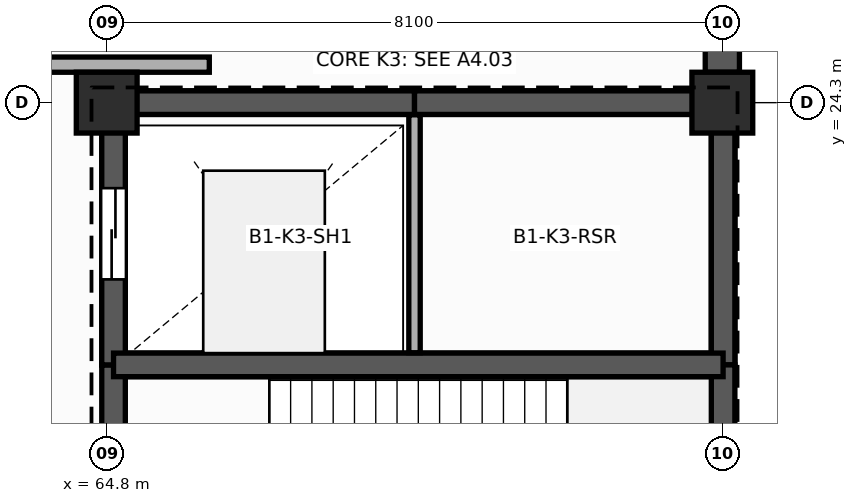
"""IFC4 building model, lengths in metres.
Left out: names, types, materials, properties, quantities, classifications, styles, units other than length and angle.
Written with IfcOpenShell. Run it as: python <this file> out.ifc"""

import sys

from ifc_helpers import new_model, si_unit, direction, frame, frame_2d, origin, origin_2d, place, context, subcontext, project, spatial, rectangle, extrude, element, fill, save


model = new_model("IFC4")
c1 = context("Model", 3, precision=1e-05, world=origin(), true_north=direction((0.0, 1.0)))
c2 = subcontext(c1, "Body", "Model", "MODEL_VIEW")
j1 = project(units=[si_unit("LENGTHUNIT", "METRE"), si_unit("PLANEANGLEUNIT", "RADIAN")], contexts=[c1])
p1 = place(None, origin())
s1 = spatial("IfcSite", under=j1, at=p1, CompositionType="ELEMENT")
p2 = place(p1, origin())
s2 = spatial("IfcBuilding", under=s1, at=p2, CompositionType="ELEMENT")
p3 = place(p2, frame((0.0, 0.0, -5.4)))
s3 = spatial("IfcBuildingStorey", under=s2, at=p3, CompositionType="ELEMENT", Elevation=-5.4)
for number, where, z_axis, x_axis in (
    (1, (64.8, 24.3, -0.4), (0.0, 0.0, 1.0), (1.0, 0.0, 0.0)),
    (2, (72.9, 24.3, -0.4), (0.0, 0.0, 1.0), (1.0, 0.0, 0.0)),
):
    element("IfcColumn", number, at=place(p3, frame(where, z_axis=z_axis, x_axis=x_axis)), inside=s3, PredefinedType="COLUMN", context=c2, shape_type="SweptSolid", body=[
        extrude(rectangle(XDim=0.8, YDim=0.8, at=origin_2d()), origin(), (0.0, 0.0, 1.0), 5.8),
    ])
p4 = place(p3, frame((72.9, 24.7, 0.0), z_axis=(0.0, 0.0, 1.0), x_axis=(0.0, 1.0, 0.0)))
e3 = element("IfcWall", 3, at=p4, inside=s3, PredefinedType="USERDEFINED", context=c2, shape_type="SweptSolid", body=[
    extrude(rectangle(XDim=7.3, YDim=0.45, at=frame_2d((3.65, 0.0))), origin(), (0.0, 0.0, 1.0), 5.1),
])
p5 = place(p3, frame((64.89, 20.85, -1.35), z_axis=(0.0, 0.0, 1.0), x_axis=(1.0, 0.0, 0.0)))
e4 = element("IfcWall", 4, at=p5, inside=s3, PredefinedType="SHEAR", context=c2, shape_type="SweptSolid", body=[
    extrude(rectangle(XDim=8.02, YDim=0.31, at=frame_2d((4.01, 0.0))), origin(), (0.0, 0.0, 1.0), 0.95),
])
p6 = place(p3, frame((72.91, 20.85, -1.35), z_axis=(0.0, 0.0, 1.0), x_axis=(0.0, 1.0, 0.0)))
e5 = element("IfcWall", 5, at=p6, inside=s3, PredefinedType="SHEAR", context=c2, shape_type="SweptSolid", body=[
    extrude(rectangle(XDim=3.45, YDim=0.31, at=frame_2d((1.725, 0.0))), origin(), (0.0, 0.0, 1.0), 0.95),
])
p7 = place(p3, frame((72.91, 24.3, -1.35), z_axis=(0.0, 0.0, 1.0), x_axis=(-1.0, 0.0, 0.0)))
e6 = element("IfcWall", 6, at=p7, inside=s3, PredefinedType="SHEAR", context=c2, shape_type="SweptSolid", body=[
    extrude(rectangle(XDim=8.02, YDim=0.31, at=frame_2d((4.01, 0.0))), origin(), (0.0, 0.0, 1.0), 0.95),
])
p8 = place(p3, frame((64.89, 24.3, -1.35), z_axis=(0.0, 0.0, 1.0), x_axis=(0.0, -1.0, 0.0)))
e7 = element("IfcWall", 7, at=p8, inside=s3, PredefinedType="SHEAR", context=c2, shape_type="SweptSolid", body=[
    extrude(rectangle(XDim=3.45, YDim=0.31, at=frame_2d((1.725, 0.0))), origin(), (0.0, 0.0, 1.0), 0.95),
])
p9 = place(p3, frame((64.89, 16.45, -0.4), z_axis=(0.0, 0.0, 1.0), x_axis=(0.0, 1.0, 0.0)))
e8 = element("IfcWall", 8, at=p9, inside=s3, PredefinedType="SHEAR", context=c2, shape_type="SweptSolid", body=[
    extrude(rectangle(XDim=4.4, YDim=0.31, at=frame_2d((2.2, 0.0))), origin(), (0.0, 0.0, 1.0), 5.8),
])
p10 = place(p9, frame((1.35, 0.0, 0.4)))
e9 = element("IfcOpeningElement", 9, at=p10, cuts=e8, PredefinedType="OPENING", context=c2, shape_type="SweptSolid", body=[
    extrude(rectangle(XDim=1.2, YDim=2.25, at=frame_2d((0.6, 1.125))), frame((0.0, 0.165, 0.0), z_axis=(0.0, -1.0, 0.0), x_axis=(1.0, 0.0, 0.0)), (0.0, 0.0, 1.0), 0.33),
])
p11 = place(p3, frame((64.89, 20.85, -0.4), z_axis=(0.0, 0.0, 1.0), x_axis=(0.0, 1.0, 0.0)))
e10 = element("IfcWall", 10, at=p11, inside=s3, PredefinedType="SHEAR", context=c2, shape_type="SweptSolid", body=[
    extrude(rectangle(XDim=3.45, YDim=0.31, at=frame_2d((1.725, 0.0))), origin(), (0.0, 0.0, 1.0), 5.8),
])
p12 = place(p11, frame((1.125, 0.0, 0.4)))
e11 = element("IfcOpeningElement", 11, at=p12, cuts=e10, PredefinedType="OPENING", context=c2, shape_type="SweptSolid", body=[
    extrude(rectangle(XDim=1.2, YDim=2.2, at=frame_2d((0.6, 1.1))), frame((0.0, 0.165, 0.0), z_axis=(0.0, -1.0, 0.0), x_axis=(1.0, 0.0, 0.0)), (0.0, 0.0, 1.0), 0.33),
])
p13 = place(p3, frame((64.89, 24.3, -0.4), z_axis=(0.0, 0.0, 1.0), x_axis=(1.0, 0.0, 0.0)))
e12 = element("IfcWall", 12, at=p13, inside=s3, PredefinedType="SHEAR", context=c2, shape_type="SweptSolid", body=[
    extrude(rectangle(XDim=3.96, YDim=0.31, at=frame_2d((1.98, 0.0))), origin(), (0.0, 0.0, 1.0), 5.8),
])
p14 = place(p3, frame((68.85, 24.3, -0.4), z_axis=(0.0, 0.0, 1.0), x_axis=(1.0, 0.0, 0.0)))
e13 = element("IfcWall", 13, at=p14, inside=s3, PredefinedType="SHEAR", context=c2, shape_type="SweptSolid", body=[
    extrude(rectangle(XDim=4.06, YDim=0.31, at=frame_2d((2.03, 0.0))), origin(), (0.0, 0.0, 1.0), 5.8),
])
p15 = place(p3, frame((72.91, 24.3, -0.4), z_axis=(0.0, 0.0, 1.0), x_axis=(0.0, -1.0, 0.0)))
e14 = element("IfcWall", 14, at=p15, inside=s3, PredefinedType="SHEAR", context=c2, shape_type="SweptSolid", body=[
    extrude(rectangle(XDim=3.45, YDim=0.31, at=frame_2d((1.725, 0.0))), origin(), (0.0, 0.0, 1.0), 5.8),
])
p16 = place(p3, frame((72.91, 20.85, -0.4), z_axis=(0.0, 0.0, 1.0), x_axis=(0.0, -1.0, 0.0)))
e15 = element("IfcWall", 15, at=p16, inside=s3, PredefinedType="SHEAR", context=c2, shape_type="SweptSolid", body=[
    extrude(rectangle(XDim=4.4, YDim=0.31, at=frame_2d((2.2, 0.0))), origin(), (0.0, 0.0, 1.0), 5.8),
])
p17 = place(p3, frame((64.89, 20.85, -0.4), z_axis=(0.0, 0.0, 1.0), x_axis=(1.0, 0.0, 0.0)))
e16 = element("IfcWall", 16, at=p17, inside=s3, PredefinedType="SHEAR", context=c2, shape_type="SweptSolid", body=[
    extrude(rectangle(XDim=8.02, YDim=0.31, at=frame_2d((4.01, 0.0))), origin(), (0.0, 0.0, 1.0), 5.8),
])
p18 = place(p3, frame((68.85, 21.01, 0.0), z_axis=(0.0, 0.0, 1.0), x_axis=(0.0, 1.0, 0.0)))
e17 = element("IfcWall", 17, at=p18, inside=s3, PredefinedType="PLUMBINGWALL", context=c2, shape_type="SweptSolid", body=[
    extrude(rectangle(XDim=3.13, YDim=0.15, at=frame_2d((1.565, 0.0))), origin(), (0.0, 0.0, 1.0), 5.05),
])
p19 = place(p3, frame((66.15, 24.8, 0.0), z_axis=(0.0, 0.0, 1.0), x_axis=(-1.0, 0.0, 0.0)))
e18 = element("IfcWall", 18, at=p19, inside=s3, PredefinedType="PARTITIONING", context=c2, shape_type="SweptSolid", body=[
    extrude(rectangle(XDim=6.35, YDim=0.2, at=frame_2d((3.175, 0.0))), origin(), (0.0, 0.0, 1.0), 5.12),
])
p20 = place(p19, frame((3.528, 0.0, 0.0)))
e19 = element("IfcOpeningElement", 19, at=p20, cuts=e18, PredefinedType="OPENING", context=c2, shape_type="SweptSolid", body=[
    extrude(rectangle(XDim=1.2, YDim=2.25, at=frame_2d((0.6, 1.125))), frame((0.0, 0.11, 0.0), z_axis=(0.0, -1.0, 0.0), x_axis=(1.0, 0.0, 0.0)), (0.0, 0.0, 1.0), 0.22),
])
p21 = place(p12, origin())
e20 = element("IfcDoor", 20, at=p21, inside=s3, OperationType="SLIDING_TO_LEFT", PredefinedType="DOOR", context=c2, shape_type="SweptSolid", body=[
    extrude(rectangle(XDim=1.2, YDim=2.2, at=frame_2d((0.6, 1.1))), frame((0.0, 0.025, 0.0), z_axis=(0.0, -1.0, 0.0), x_axis=(1.0, 0.0, 0.0)), (0.0, 0.0, 1.0), 0.05),
])
fill(e11, e20)
save(model, sys.argv[1])
